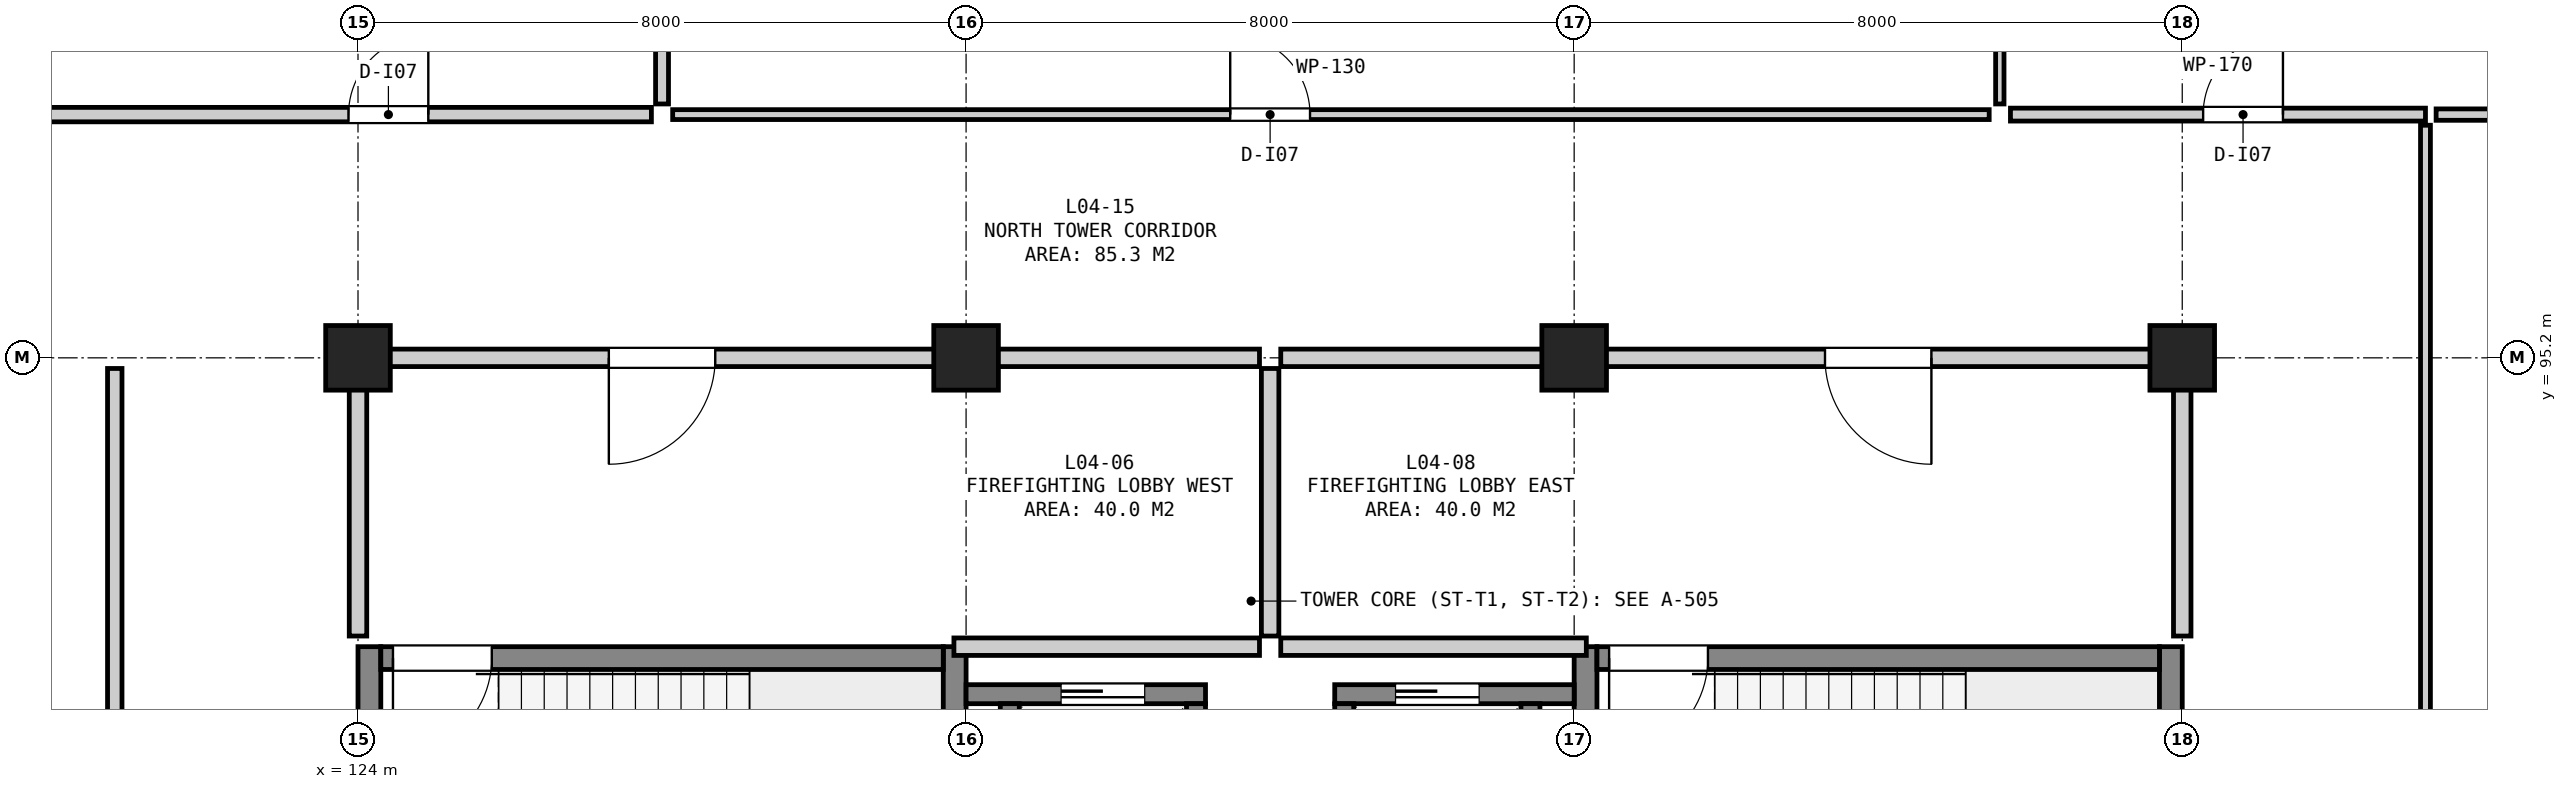
"""IFC4 building model, lengths in metres.
Left out: names, types, materials, properties, quantities, classifications, styles, units other than length and angle.
Written with IfcOpenShell. Run it as: python <this file> out.ifc"""

import sys

from ifc_helpers import new_model, si_unit, direction, frame, frame_2d, origin, origin_2d, place, context, subcontext, project, spatial, rectangle, extrude, element, fill, save


model = new_model("IFC4")
c1 = context("Model", 3, precision=1e-05, world=origin(), true_north=direction((0.0, 1.0)))
c2 = subcontext(c1, "Body", "Model", "MODEL_VIEW")
j1 = project(units=[si_unit("LENGTHUNIT", "METRE"), si_unit("PLANEANGLEUNIT", "RADIAN")], contexts=[c1])
p1 = place(None, origin())
s1 = spatial("IfcSite", under=j1, at=p1, CompositionType="ELEMENT")
p2 = place(p1, origin())
s2 = spatial("IfcBuilding", under=s1, at=p2, CompositionType="ELEMENT")
p3 = place(p2, frame((0.0, 0.0, 19.8)))
s3 = spatial("IfcBuildingStorey", under=s2, at=p3, CompositionType="ELEMENT", Elevation=19.8)
for number, where, z_axis, x_axis in (
    (1, (124.0, 95.2, 0.0), (0.0, 0.0, 1.0), (1.0, 0.0, 0.0)),
    (2, (132.0, 95.2, 0.0), (0.0, 0.0, 1.0), (1.0, 0.0, 0.0)),
    (3, (140.0, 95.2, 0.0), (0.0, 0.0, 1.0), (1.0, 0.0, 0.0)),
    (4, (148.0, 95.2, 0.0), (0.0, 0.0, 1.0), (1.0, 0.0, 0.0)),
):
    element("IfcColumn", number, at=place(p3, frame(where, z_axis=z_axis, x_axis=x_axis)), inside=s3, PredefinedType="COLUMN", context=c2, shape_type="SweptSolid", body=[
        extrude(rectangle(XDim=0.85, YDim=0.85, at=origin_2d()), origin(), (0.0, 0.0, 1.0), 4.0),
    ])
for number, where, z_axis, x_axis in (
    (5, (124.15, 87.2, 0.0), (0.0, 0.0, 1.0), (0.0, 1.0, 0.0)),
    (6, (131.85, 87.2, 0.0), (0.0, 0.0, 1.0), (0.0, 1.0, 0.0)),
):
    element("IfcWall", number, at=place(p3, frame(where, z_axis=z_axis, x_axis=x_axis)), inside=s3, PredefinedType="SHEAR", context=c2, shape_type="SweptSolid", body=[
        extrude(rectangle(XDim=4.2, YDim=0.3, at=frame_2d((2.1, 0.0))), origin(), (0.0, 0.0, 1.0), 3.72),
    ])
p4 = place(p3, frame((124.3, 91.25, 0.0), z_axis=(0.0, 0.0, 1.0), x_axis=(1.0, 0.0, 0.0)))
e7 = element("IfcWall", 7, at=p4, inside=s3, PredefinedType="SHEAR", context=c2, shape_type="SweptSolid", body=[
    extrude(rectangle(XDim=7.4, YDim=0.3, at=frame_2d((3.7, 0.0))), origin(), (0.0, 0.0, 1.0), 3.72),
])
p5 = place(p4, frame((0.16, 0.0, 0.0)))
e8 = element("IfcOpeningElement", 8, at=p5, cuts=e7, PredefinedType="OPENING", context=c2, shape_type="SweptSolid", body=[
    extrude(rectangle(XDim=1.3, YDim=2.18, at=frame_2d((0.65, 1.09))), frame((0.0, 0.162, 0.0), z_axis=(0.0, -1.0, 0.0), x_axis=(1.0, 0.0, 0.0)), (0.0, 0.0, 1.0), 0.324),
])
for number, where, z_axis, x_axis in (
    (9, (140.15, 87.2, 0.0), (0.0, 0.0, 1.0), (0.0, 1.0, 0.0)),
    (10, (147.85, 87.2, 0.0), (0.0, 0.0, 1.0), (0.0, 1.0, 0.0)),
):
    element("IfcWall", number, at=place(p3, frame(where, z_axis=z_axis, x_axis=x_axis)), inside=s3, PredefinedType="SHEAR", context=c2, shape_type="SweptSolid", body=[
        extrude(rectangle(XDim=4.2, YDim=0.3, at=frame_2d((2.1, 0.0))), origin(), (0.0, 0.0, 1.0), 3.72),
    ])
p6 = place(p3, frame((140.3, 91.25, 0.0), z_axis=(0.0, 0.0, 1.0), x_axis=(1.0, 0.0, 0.0)))
e11 = element("IfcWall", 11, at=p6, inside=s3, PredefinedType="SHEAR", context=c2, shape_type="SweptSolid", body=[
    extrude(rectangle(XDim=7.4, YDim=0.3, at=frame_2d((3.7, 0.0))), origin(), (0.0, 0.0, 1.0), 3.72),
])
p7 = place(p6, frame((0.16, 0.0, 0.0)))
e12 = element("IfcOpeningElement", 12, at=p7, cuts=e11, PredefinedType="OPENING", context=c2, shape_type="SweptSolid", body=[
    extrude(rectangle(XDim=1.3, YDim=2.18, at=frame_2d((0.65, 1.09))), frame((0.0, 0.162, 0.0), z_axis=(0.0, -1.0, 0.0), x_axis=(1.0, 0.0, 0.0)), (0.0, 0.0, 1.0), 0.324),
])
p8 = place(p3, frame((132.0, 90.775, 0.0), z_axis=(0.0, 0.0, 1.0), x_axis=(1.0, 0.0, 0.0)))
e13 = element("IfcWall", 13, at=p8, inside=s3, PredefinedType="SHEAR", context=c2, shape_type="SweptSolid", body=[
    extrude(rectangle(XDim=3.15, YDim=0.25, at=frame_2d((1.575, 0.0))), origin(), (0.0, 0.0, 1.0), 3.72),
])
p9 = place(p8, frame((1.25, 0.0, 0.0)))
e14 = element("IfcOpeningElement", 14, at=p9, cuts=e13, PredefinedType="OPENING", context=c2, shape_type="SweptSolid", body=[
    extrude(rectangle(XDim=1.1, YDim=2.15, at=frame_2d((0.55, 1.075))), frame((0.0, 0.137, 0.0), z_axis=(0.0, -1.0, 0.0), x_axis=(1.0, 0.0, 0.0)), (0.0, 0.0, 1.0), 0.274),
])
for number, where, z_axis, x_axis in (
    (15, (132.575, 87.75, 0.0), (0.0, 0.0, 1.0), (0.0, 1.0, 0.0)),
    (16, (135.025, 87.75, 0.0), (0.0, 0.0, 1.0), (0.0, 1.0, 0.0)),
):
    element("IfcWall", number, at=place(p3, frame(where, z_axis=z_axis, x_axis=x_axis)), inside=s3, PredefinedType="SHEAR", context=c2, shape_type="SweptSolid", body=[
        extrude(rectangle(XDim=2.9, YDim=0.25, at=frame_2d((1.45, 0.0))), origin(), (0.0, 0.0, 1.0), 3.72),
    ])
p10 = place(p3, frame((136.85, 90.775, 0.0), z_axis=(0.0, 0.0, 1.0), x_axis=(1.0, 0.0, 0.0)))
e17 = element("IfcWall", 17, at=p10, inside=s3, PredefinedType="SHEAR", context=c2, shape_type="SweptSolid", body=[
    extrude(rectangle(XDim=3.15, YDim=0.25, at=frame_2d((1.575, 0.0))), origin(), (0.0, 0.0, 1.0), 3.72),
])
p11 = place(p10, frame((0.8, 0.0, 0.0)))
e18 = element("IfcOpeningElement", 18, at=p11, cuts=e17, PredefinedType="OPENING", context=c2, shape_type="SweptSolid", body=[
    extrude(rectangle(XDim=1.1, YDim=2.15, at=frame_2d((0.55, 1.075))), frame((0.0, 0.137, 0.0), z_axis=(0.0, -1.0, 0.0), x_axis=(1.0, 0.0, 0.0)), (0.0, 0.0, 1.0), 0.274),
])
for number, where, z_axis, x_axis in (
    (19, (136.975, 87.75, 0.0), (0.0, 0.0, 1.0), (0.0, 1.0, 0.0)),
    (20, (139.425, 87.75, 0.0), (0.0, 0.0, 1.0), (0.0, 1.0, 0.0)),
):
    element("IfcWall", number, at=place(p3, frame(where, z_axis=z_axis, x_axis=x_axis)), inside=s3, PredefinedType="SHEAR", context=c2, shape_type="SweptSolid", body=[
        extrude(rectangle(XDim=2.9, YDim=0.25, at=frame_2d((1.45, 0.0))), origin(), (0.0, 0.0, 1.0), 3.72),
    ])
p12 = place(p3, frame((131.84, 91.4, 0.0), z_axis=(0.0, 0.0, 1.0), x_axis=(1.0, 0.0, 0.0)))
e21 = element("IfcWall", 21, at=p12, inside=s3, PredefinedType="SOLIDWALL", context=c2, shape_type="SweptSolid", body=[
    extrude(rectangle(XDim=4.02, YDim=0.23, at=frame_2d((2.01, 0.0))), origin(), (0.0, 0.0, 1.0), 3.72),
])
p13 = place(p3, frame((124.14, 95.2, 0.0), z_axis=(0.0, 0.0, 1.0), x_axis=(1.0, 0.0, 0.0)))
e22 = element("IfcWall", 22, at=p13, inside=s3, PredefinedType="SOLIDWALL", context=c2, shape_type="SweptSolid", body=[
    extrude(rectangle(XDim=11.72, YDim=0.23, at=frame_2d((5.86, 0.0))), origin(), (0.0, 0.0, 1.0), 3.195),
])
p14 = place(p13, frame((3.16, 0.0, 0.0)))
e23 = element("IfcOpeningElement", 23, at=p14, cuts=e22, PredefinedType="OPENING", context=c2, shape_type="SweptSolid", body=[
    extrude(rectangle(XDim=1.4, YDim=2.2, at=frame_2d((0.7, 1.1))), frame((0.0, 0.127, 0.0), z_axis=(0.0, -1.0, 0.0), x_axis=(1.0, 0.0, 0.0)), (0.0, 0.0, 1.0), 0.254),
])
p15 = place(p3, frame((124.0, 91.54, 0.0), z_axis=(0.0, 0.0, 1.0), x_axis=(0.0, 1.0, 0.0)))
e24 = element("IfcWall", 24, at=p15, inside=s3, PredefinedType="SOLIDWALL", context=c2, shape_type="SweptSolid", body=[
    extrude(rectangle(XDim=3.52, YDim=0.23, at=frame_2d((1.76, 0.0))), origin(), (0.0, 0.0, 1.0), 2.845),
])
p16 = place(p3, frame((136.0, 91.54, 0.0), z_axis=(0.0, 0.0, 1.0), x_axis=(0.0, 1.0, 0.0)))
e25 = element("IfcWall", 25, at=p16, inside=s3, PredefinedType="SOLIDWALL", context=c2, shape_type="SweptSolid", body=[
    extrude(rectangle(XDim=3.52, YDim=0.23, at=frame_2d((1.76, 0.0))), origin(), (0.0, 0.0, 1.0), 3.72),
])
p17 = place(p3, frame((136.14, 91.4, 0.0), z_axis=(0.0, 0.0, 1.0), x_axis=(1.0, 0.0, 0.0)))
e26 = element("IfcWall", 26, at=p17, inside=s3, PredefinedType="SOLIDWALL", context=c2, shape_type="SweptSolid", body=[
    extrude(rectangle(XDim=4.02, YDim=0.23, at=frame_2d((2.01, 0.0))), origin(), (0.0, 0.0, 1.0), 3.72),
])
p18 = place(p3, frame((136.14, 95.2, 0.0), z_axis=(0.0, 0.0, 1.0), x_axis=(1.0, 0.0, 0.0)))
e27 = element("IfcWall", 27, at=p18, inside=s3, PredefinedType="SOLIDWALL", context=c2, shape_type="SweptSolid", body=[
    extrude(rectangle(XDim=11.72, YDim=0.23, at=frame_2d((5.86, 0.0))), origin(), (0.0, 0.0, 1.0), 3.195),
])
p19 = place(p18, frame((7.16, 0.0, 0.0)))
e28 = element("IfcOpeningElement", 28, at=p19, cuts=e27, PredefinedType="OPENING", context=c2, shape_type="SweptSolid", body=[
    extrude(rectangle(XDim=1.4, YDim=2.2, at=frame_2d((0.7, 1.1))), frame((0.0, 0.127, 0.0), z_axis=(0.0, -1.0, 0.0), x_axis=(1.0, 0.0, 0.0)), (0.0, 0.0, 1.0), 0.254),
])
p20 = place(p3, frame((148.0, 91.54, 0.0), z_axis=(0.0, 0.0, 1.0), x_axis=(0.0, 1.0, 0.0)))
e29 = element("IfcWall", 29, at=p20, inside=s3, PredefinedType="SOLIDWALL", context=c2, shape_type="SweptSolid", body=[
    extrude(rectangle(XDim=3.52, YDim=0.23, at=frame_2d((1.76, 0.0))), origin(), (0.0, 0.0, 1.0), 3.245),
])
p21 = place(p3, frame((120.8, 80.74, 0.0), z_axis=(0.0, 0.0, 1.0), x_axis=(0.0, 1.0, 0.0)))
e30 = element("IfcWall", 30, at=p21, inside=s3, PredefinedType="PARTITIONING", context=c2, shape_type="SweptSolid", body=[
    extrude(rectangle(XDim=14.32, YDim=0.19, at=frame_2d((7.16, 0.0))), origin(), (0.0, 0.0, 1.0), 3.72),
])
p22 = place(p3, frame((151.34, 98.4, 0.0), z_axis=(0.0, 0.0, 1.0), x_axis=(1.0, 0.0, 0.0)))
e31 = element("IfcWall", 31, at=p22, inside=s3, PredefinedType="PARTITIONING", context=c2, shape_type="SweptSolid", body=[
    extrude(rectangle(XDim=16.565, YDim=0.15, at=frame_2d((8.282, 0.0))), origin(), (0.0, 0.0, 1.0), 3.72),
])
p23 = place(p3, frame((151.2, 76.14, 0.0), z_axis=(0.0, 0.0, 1.0), x_axis=(0.0, 1.0, 0.0)))
e32 = element("IfcWall", 32, at=p23, inside=s3, PredefinedType="PARTITIONING", context=c2, shape_type="SweptSolid", body=[
    extrude(rectangle(XDim=22.12, YDim=0.13, at=frame_2d((11.06, 0.0))), origin(), (0.0, 0.0, 1.0), 3.72),
])
p24 = place(p23, frame((10.535, 0.0, 0.0)))
e33 = element("IfcOpeningElement", 33, at=p24, cuts=e32, PredefinedType="OPENING", context=c2, shape_type="SweptSolid", body=[
    extrude(rectangle(XDim=1.05, YDim=2.15, at=frame_2d((0.525, 1.075))), frame((0.0, 0.077, 0.0), z_axis=(0.0, -1.0, 0.0), x_axis=(1.0, 0.0, 0.0)), (0.0, 0.0, 1.0), 0.154),
])
p25 = place(p3, frame((110.495, 98.4, 0.0), z_axis=(0.0, 0.0, 1.0), x_axis=(1.0, 0.0, 0.0)))
e34 = element("IfcWall", 34, at=p25, inside=s3, PredefinedType="PARTITIONING", context=c2, shape_type="SweptSolid", body=[
    extrude(rectangle(XDim=17.365, YDim=0.19, at=frame_2d((8.683, 0.0))), origin(), (0.0, 0.0, 1.0), 3.72),
])
p26 = place(p25, frame((13.38, 0.0, 0.0)))
e35 = element("IfcOpeningElement", 35, at=p26, cuts=e34, PredefinedType="OPENING", context=c2, shape_type="SweptSolid", body=[
    extrude(rectangle(XDim=1.05, YDim=2.15, at=frame_2d((0.525, 1.075))), frame((0.0, 0.107, 0.0), z_axis=(0.0, -1.0, 0.0), x_axis=(1.0, 0.0, 0.0)), (0.0, 0.0, 1.0), 0.214),
])
p27 = place(p3, frame((128.0, 98.54, 0.0), z_axis=(0.0, 0.0, 1.0), x_axis=(0.0, 1.0, 0.0)))
e36 = element("IfcWall", 36, at=p27, inside=s3, PredefinedType="PARTITIONING", context=c2, shape_type="SweptSolid", body=[
    extrude(rectangle(XDim=16.565, YDim=0.17, at=frame_2d((8.282, 0.0))), origin(), (0.0, 0.0, 1.0), 3.72),
])
p28 = place(p3, frame((128.14, 98.4, 0.0), z_axis=(0.0, 0.0, 1.0), x_axis=(1.0, 0.0, 0.0)))
e37 = element("IfcWall", 37, at=p28, inside=s3, PredefinedType="PARTITIONING", context=c2, shape_type="SweptSolid", body=[
    extrude(rectangle(XDim=17.32, YDim=0.13, at=frame_2d((8.66, 0.0))), origin(), (0.0, 0.0, 1.0), 3.72),
])
p29 = place(p28, frame((7.335, 0.0, 0.0)))
e38 = element("IfcOpeningElement", 38, at=p29, cuts=e37, PredefinedType="OPENING", context=c2, shape_type="SweptSolid", body=[
    extrude(rectangle(XDim=1.05, YDim=2.15, at=frame_2d((0.525, 1.075))), frame((0.0, 0.077, 0.0), z_axis=(0.0, -1.0, 0.0), x_axis=(1.0, 0.0, 0.0)), (0.0, 0.0, 1.0), 0.154),
])
p30 = place(p3, frame((145.6, 98.54, 0.0), z_axis=(0.0, 0.0, 1.0), x_axis=(0.0, 1.0, 0.0)))
e39 = element("IfcWall", 39, at=p30, inside=s3, PredefinedType="PARTITIONING", context=c2, shape_type="SweptSolid", body=[
    extrude(rectangle(XDim=16.565, YDim=0.11, at=frame_2d((8.282, 0.0))), origin(), (0.0, 0.0, 1.0), 3.72),
])
p31 = place(p3, frame((145.74, 98.4, 0.0), z_axis=(0.0, 0.0, 1.0), x_axis=(1.0, 0.0, 0.0)))
e40 = element("IfcWall", 40, at=p31, inside=s3, PredefinedType="PARTITIONING", context=c2, shape_type="SweptSolid", body=[
    extrude(rectangle(XDim=5.46, YDim=0.17, at=frame_2d((2.73, 0.0))), origin(), (0.0, 0.0, 1.0), 3.72),
])
p32 = place(p31, frame((2.535, 0.0, 0.0)))
e41 = element("IfcOpeningElement", 41, at=p32, cuts=e40, PredefinedType="OPENING", context=c2, shape_type="SweptSolid", body=[
    extrude(rectangle(XDim=1.05, YDim=2.15, at=frame_2d((0.525, 1.075))), frame((0.0, 0.097, 0.0), z_axis=(0.0, -1.0, 0.0), x_axis=(1.0, 0.0, 0.0)), (0.0, 0.0, 1.0), 0.194),
])
p33 = place(p5, frame((1.3, 0.0, 0.0), z_axis=(0.0, 0.0, 1.0), x_axis=(-1.0, 0.0, 0.0)))
e42 = element("IfcDoor", 42, at=p33, inside=s3, OperationType="SINGLE_SWING_RIGHT", PredefinedType="DOOR", context=c2, shape_type="SweptSolid", body=[
    extrude(rectangle(XDim=1.3, YDim=2.18, at=frame_2d((0.65, 1.09))), frame((0.0, 0.025, 0.0), z_axis=(0.0, -1.0, 0.0), x_axis=(1.0, 0.0, 0.0)), (0.0, 0.0, 1.0), 0.05),
])
fill(e8, e42)
p34 = place(p7, frame((1.3, 0.0, 0.0), z_axis=(0.0, 0.0, 1.0), x_axis=(-1.0, 0.0, 0.0)))
e43 = element("IfcDoor", 43, at=p34, inside=s3, OperationType="SINGLE_SWING_RIGHT", PredefinedType="DOOR", context=c2, shape_type="SweptSolid", body=[
    extrude(rectangle(XDim=1.3, YDim=2.18, at=frame_2d((0.65, 1.09))), frame((0.0, 0.025, 0.0), z_axis=(0.0, -1.0, 0.0), x_axis=(1.0, 0.0, 0.0)), (0.0, 0.0, 1.0), 0.05),
])
fill(e12, e43)
p35 = place(p9, origin())
e44 = element("IfcDoor", 44, at=p35, inside=s3, OperationType="SLIDING_TO_LEFT", PredefinedType="DOOR", context=c2, shape_type="SweptSolid", body=[
    extrude(rectangle(XDim=1.1, YDim=2.15, at=frame_2d((0.55, 1.075))), frame((0.0, 0.025, 0.0), z_axis=(0.0, -1.0, 0.0), x_axis=(1.0, 0.0, 0.0)), (0.0, 0.0, 1.0), 0.05),
])
fill(e14, e44)
p36 = place(p11, origin())
e45 = element("IfcDoor", 45, at=p36, inside=s3, OperationType="SLIDING_TO_LEFT", PredefinedType="DOOR", context=c2, shape_type="SweptSolid", body=[
    extrude(rectangle(XDim=1.1, YDim=2.15, at=frame_2d((0.55, 1.075))), frame((0.0, 0.025, 0.0), z_axis=(0.0, -1.0, 0.0), x_axis=(1.0, 0.0, 0.0)), (0.0, 0.0, 1.0), 0.05),
])
fill(e18, e45)
p37 = place(p14, frame((1.4, 0.0, 0.0), z_axis=(0.0, 0.0, 1.0), x_axis=(-1.0, 0.0, 0.0)))
e46 = element("IfcDoor", 46, at=p37, inside=s3, OperationType="SINGLE_SWING_RIGHT", PredefinedType="DOOR", context=c2, shape_type="SweptSolid", body=[
    extrude(rectangle(XDim=1.4, YDim=2.2, at=frame_2d((0.7, 1.1))), frame((0.0, 0.025, 0.0), z_axis=(0.0, -1.0, 0.0), x_axis=(1.0, 0.0, 0.0)), (0.0, 0.0, 1.0), 0.05),
])
fill(e23, e46)
p38 = place(p19, frame((1.4, 0.0, 0.0), z_axis=(0.0, 0.0, 1.0), x_axis=(-1.0, 0.0, 0.0)))
e47 = element("IfcDoor", 47, at=p38, inside=s3, OperationType="SINGLE_SWING_LEFT", PredefinedType="DOOR", context=c2, shape_type="SweptSolid", body=[
    extrude(rectangle(XDim=1.4, YDim=2.2, at=frame_2d((0.7, 1.1))), frame((0.0, 0.025, 0.0), z_axis=(0.0, -1.0, 0.0), x_axis=(1.0, 0.0, 0.0)), (0.0, 0.0, 1.0), 0.05),
])
fill(e28, e47)
p39 = place(p26, origin())
e48 = element("IfcDoor", 48, at=p39, inside=s3, OperationType="SINGLE_SWING_RIGHT", PredefinedType="DOOR", context=c2, shape_type="SweptSolid", body=[
    extrude(rectangle(XDim=1.05, YDim=2.15, at=frame_2d((0.525, 1.075))), frame((0.0, 0.025, 0.0), z_axis=(0.0, -1.0, 0.0), x_axis=(1.0, 0.0, 0.0)), (0.0, 0.0, 1.0), 0.05),
])
fill(e35, e48)
p40 = place(p29, origin())
e49 = element("IfcDoor", 49, at=p40, inside=s3, OperationType="SINGLE_SWING_LEFT", PredefinedType="DOOR", context=c2, shape_type="SweptSolid", body=[
    extrude(rectangle(XDim=1.05, YDim=2.15, at=frame_2d((0.525, 1.075))), frame((0.0, 0.025, 0.0), z_axis=(0.0, -1.0, 0.0), x_axis=(1.0, 0.0, 0.0)), (0.0, 0.0, 1.0), 0.05),
])
fill(e38, e49)
p41 = place(p32, origin())
e50 = element("IfcDoor", 50, at=p41, inside=s3, OperationType="SINGLE_SWING_RIGHT", PredefinedType="DOOR", context=c2, shape_type="SweptSolid", body=[
    extrude(rectangle(XDim=1.05, YDim=2.15, at=frame_2d((0.525, 1.075))), frame((0.0, 0.025, 0.0), z_axis=(0.0, -1.0, 0.0), x_axis=(1.0, 0.0, 0.0)), (0.0, 0.0, 1.0), 0.05),
])
fill(e41, e50)
save(model, sys.argv[1])
